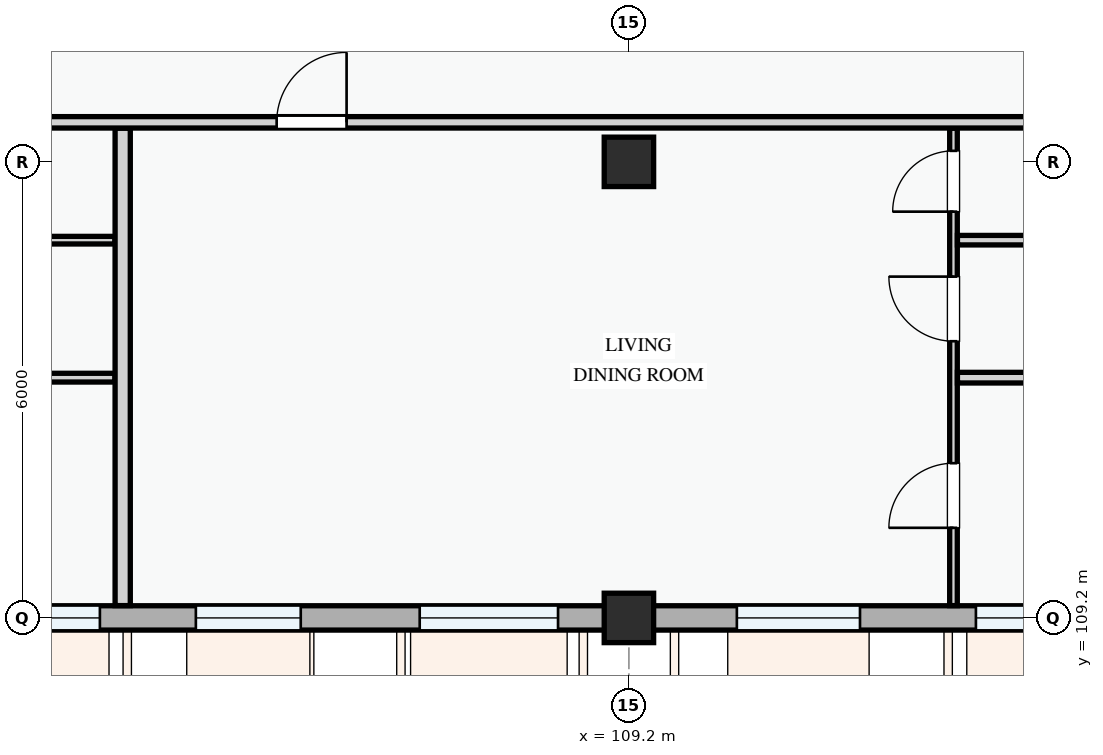
"""IFC4 building model, lengths in metres.
Left out: names, types, materials, properties, quantities, classifications, styles, units other than length and angle.
Written with IfcOpenShell. Run it as: python <this file> out.ifc"""

import sys

from ifc_helpers import new_model, si_unit, direction, frame, frame_2d, origin, origin_2d, place, context, subcontext, project, spatial, rectangle, extrude, element, fill, save


model = new_model("IFC4")
c1 = context("Model", 3, precision=1e-05, world=origin(), true_north=direction((0.0, 1.0)))
c2 = subcontext(c1, "Body", "Model", "MODEL_VIEW")
j1 = project(units=[si_unit("LENGTHUNIT", "METRE"), si_unit("PLANEANGLEUNIT", "RADIAN")], contexts=[c1])
p1 = place(None, origin())
s1 = spatial("IfcSite", under=j1, at=p1, CompositionType="ELEMENT")
p2 = place(p1, origin())
s2 = spatial("IfcBuilding", under=s1, at=p2, CompositionType="ELEMENT")
p3 = place(p2, frame((0.0, 0.0, 18.0)))
s3 = spatial("IfcBuildingStorey", under=s2, at=p3, CompositionType="ELEMENT", Elevation=18.0)
for number, where, z_axis, x_axis in (
    (1, (109.2, 109.2, 0.0), (0.0, 0.0, 1.0), (1.0, 0.0, 0.0)),
    (2, (109.2, 115.2, 0.0), (0.0, 0.0, 1.0), (1.0, 0.0, 0.0)),
):
    element("IfcColumn", number, at=place(p3, frame(where, z_axis=z_axis, x_axis=x_axis)), inside=s3, PredefinedType="COLUMN", context=c2, shape_type="SweptSolid", body=[
        extrude(rectangle(XDim=0.65, YDim=0.65, at=origin_2d()), origin(), (0.0, 0.0, 1.0), 3.3),
    ])
p4 = place(p3, frame((100.8, 109.2, 0.0), z_axis=(0.0, 0.0, 1.0), x_axis=(1.0, 0.0, 0.0)))
e3 = element("IfcWall", 3, at=p4, inside=s3, PredefinedType="STANDARD", context=c2, shape_type="SweptSolid", body=[
    extrude(rectangle(XDim=8.4, YDim=0.32, at=frame_2d((4.2, 0.0))), origin(), (0.0, 0.0, 1.0), 2.375),
])
p5 = place(p4, frame((0.49, 0.0, 0.78)))
e4 = element("IfcOpeningElement", 4, at=p5, cuts=e3, PredefinedType="OPENING", context=c2, shape_type="SweptSolid", body=[
    extrude(rectangle(XDim=0.95, YDim=1.15, at=frame_2d((0.475, 0.575))), frame((0.0, 0.17, 0.0), z_axis=(0.0, -1.0, 0.0), x_axis=(1.0, 0.0, 0.0)), (0.0, 0.0, 1.0), 0.34),
])
p6 = place(p4, frame((2.702, 0.0, 0.78)))
e5 = element("IfcOpeningElement", 5, at=p6, cuts=e3, PredefinedType="OPENING", context=c2, shape_type="SweptSolid", body=[
    extrude(rectangle(XDim=1.38, YDim=1.48, at=frame_2d((0.69, 0.74))), frame((0.0, 0.17, 0.0), z_axis=(0.0, -1.0, 0.0), x_axis=(1.0, 0.0, 0.0)), (0.0, 0.0, 1.0), 0.34),
])
p7 = place(p4, frame((5.647, 0.0, 0.78)))
e6 = element("IfcOpeningElement", 6, at=p7, cuts=e3, PredefinedType="OPENING", context=c2, shape_type="SweptSolid", body=[
    extrude(rectangle(XDim=1.82, YDim=1.46, at=frame_2d((0.91, 0.73))), frame((0.0, 0.17, 0.0), z_axis=(0.0, -1.0, 0.0), x_axis=(1.0, 0.0, 0.0)), (0.0, 0.0, 1.0), 0.34),
])
p8 = place(p3, frame((109.2, 109.2, 0.0), z_axis=(0.0, 0.0, 1.0), x_axis=(1.0, 0.0, 0.0)))
e7 = element("IfcWall", 7, at=p8, inside=s3, PredefinedType="STANDARD", context=c2, shape_type="SweptSolid", body=[
    extrude(rectangle(XDim=6.0, YDim=0.32, at=frame_2d((3.0, 0.0))), origin(), (0.0, 0.0, 1.0), 2.475),
])
p9 = place(p8, frame((1.42, 0.0, 0.78)))
e8 = element("IfcOpeningElement", 8, at=p9, cuts=e7, PredefinedType="OPENING", context=c2, shape_type="SweptSolid", body=[
    extrude(rectangle(XDim=1.62, YDim=1.38, at=frame_2d((0.81, 0.69))), frame((0.0, 0.17, 0.0), z_axis=(0.0, -1.0, 0.0), x_axis=(1.0, 0.0, 0.0)), (0.0, 0.0, 1.0), 0.34),
])
p10 = place(p8, frame((4.565, 0.0, 0.78)))
e9 = element("IfcOpeningElement", 9, at=p10, cuts=e7, PredefinedType="OPENING", context=c2, shape_type="SweptSolid", body=[
    extrude(rectangle(XDim=0.95, YDim=1.15, at=frame_2d((0.475, 0.575))), frame((0.0, 0.17, 0.0), z_axis=(0.0, -1.0, 0.0), x_axis=(1.0, 0.0, 0.0)), (0.0, 0.0, 1.0), 0.34),
])
p11 = place(p3, frame((91.564, 112.361, 0.0), z_axis=(0.0, 0.0, 1.0), x_axis=(1.0, 0.0, 0.0)))
e10 = element("IfcWall", 10, at=p11, inside=s3, PredefinedType="PARTITIONING", context=c2, shape_type="SweptSolid", body=[
    extrude(rectangle(XDim=10.874, YDim=0.115, at=frame_2d((5.437, 0.0))), origin(), (0.0, 0.0, 1.0), 3.0),
])
p12 = place(p3, frame((91.564, 114.17, 0.0), z_axis=(0.0, 0.0, 1.0), x_axis=(1.0, 0.0, 0.0)))
e11 = element("IfcWall", 11, at=p12, inside=s3, PredefinedType="PARTITIONING", context=c2, shape_type="SweptSolid", body=[
    extrude(rectangle(XDim=10.874, YDim=0.1, at=frame_2d((5.437, 0.0))), origin(), (0.0, 0.0, 1.0), 3.0),
])
p13 = place(p3, frame((113.47, 109.362, 0.0), z_axis=(0.0, 0.0, 1.0), x_axis=(0.0, 1.0, 0.0)))
e12 = element("IfcWall", 12, at=p13, inside=s3, PredefinedType="PARTITIONING", context=c2, shape_type="SweptSolid", body=[
    extrude(rectangle(XDim=6.281, YDim=0.1, at=frame_2d((3.141, 0.0))), origin(), (0.0, 0.0, 1.0), 3.0),
])
p14 = place(p13, frame((1.023, 0.0, 0.0)))
e13 = element("IfcOpeningElement", 13, at=p14, cuts=e12, PredefinedType="OPENING", context=c2, shape_type="SweptSolid", body=[
    extrude(rectangle(XDim=0.85, YDim=2.1, at=frame_2d((0.425, 1.05))), frame((0.0, 0.06, 0.0), z_axis=(0.0, -1.0, 0.0), x_axis=(1.0, 0.0, 0.0)), (0.0, 0.0, 1.0), 0.12),
])
p15 = place(p13, frame((3.478, 0.0, 0.0)))
e14 = element("IfcOpeningElement", 14, at=p15, cuts=e12, PredefinedType="OPENING", context=c2, shape_type="SweptSolid", body=[
    extrude(rectangle(XDim=0.85, YDim=2.1, at=frame_2d((0.425, 1.05))), frame((0.0, 0.06, 0.0), z_axis=(0.0, -1.0, 0.0), x_axis=(1.0, 0.0, 0.0)), (0.0, 0.0, 1.0), 0.12),
])
p16 = place(p13, frame((5.183, 0.0, 0.0)))
e15 = element("IfcOpeningElement", 15, at=p16, cuts=e12, PredefinedType="OPENING", context=c2, shape_type="SweptSolid", body=[
    extrude(rectangle(XDim=0.8, YDim=2.1, at=frame_2d((0.4, 1.05))), frame((0.0, 0.06, 0.0), z_axis=(0.0, -1.0, 0.0), x_axis=(1.0, 0.0, 0.0)), (0.0, 0.0, 1.0), 0.12),
])
p17 = place(p3, frame((113.522, 112.361, 0.0), z_axis=(0.0, 0.0, 1.0), x_axis=(1.0, 0.0, 0.0)))
e16 = element("IfcWall", 16, at=p17, inside=s3, PredefinedType="PARTITIONING", context=c2, shape_type="SweptSolid", body=[
    extrude(rectangle(XDim=11.783, YDim=0.14, at=frame_2d((5.892, 0.0))), origin(), (0.0, 0.0, 1.0), 3.0),
])
p18 = place(p3, frame((113.522, 114.17, 0.0), z_axis=(0.0, 0.0, 1.0), x_axis=(1.0, 0.0, 0.0)))
e17 = element("IfcWall", 17, at=p18, inside=s3, PredefinedType="PARTITIONING", context=c2, shape_type="SweptSolid", body=[
    extrude(rectangle(XDim=11.783, YDim=0.125, at=frame_2d((5.892, 0.0))), origin(), (0.0, 0.0, 1.0), 3.0),
])
p19 = place(p3, frame((102.54, 109.362, 0.0), z_axis=(0.0, 0.0, 1.0), x_axis=(0.0, 1.0, 0.0)))
e18 = element("IfcWall", 18, at=p19, inside=s3, PredefinedType="PARTITIONING", context=c2, shape_type="SweptSolid", body=[
    extrude(rectangle(XDim=6.281, YDim=0.2, at=frame_2d((3.141, 0.0))), origin(), (0.0, 0.0, 1.0), 3.0),
])
p20 = place(p3, frame((80.562, 115.72, 0.0), z_axis=(0.0, 0.0, 1.0), x_axis=(1.0, 0.0, 0.0)))
e19 = element("IfcWall", 19, at=p20, inside=s3, PredefinedType="PARTITIONING", context=c2, shape_type="SweptSolid", body=[
    extrude(rectangle(XDim=69.488, YDim=0.15, at=frame_2d((34.744, 0.0))), origin(), (0.0, 0.0, 1.0), 3.0),
])
p21 = place(p20, frame((9.429, 0.0, 0.0)))
e20 = element("IfcOpeningElement", 20, at=p21, cuts=e19, PredefinedType="OPENING", context=c2, shape_type="SweptSolid", body=[
    extrude(rectangle(XDim=0.96, YDim=2.12, at=frame_2d((0.48, 1.06))), frame((0.0, 0.085, 0.0), z_axis=(0.0, -1.0, 0.0), x_axis=(1.0, 0.0, 0.0)), (0.0, 0.0, 1.0), 0.17),
])
p22 = place(p20, frame((24.004, 0.0, 0.0)))
e21 = element("IfcOpeningElement", 21, at=p22, cuts=e19, PredefinedType="OPENING", context=c2, shape_type="SweptSolid", body=[
    extrude(rectangle(XDim=0.92, YDim=2.1, at=frame_2d((0.46, 1.05))), frame((0.0, 0.085, 0.0), z_axis=(0.0, -1.0, 0.0), x_axis=(1.0, 0.0, 0.0)), (0.0, 0.0, 1.0), 0.17),
])
p23 = place(p20, frame((52.697, 0.0, 0.0)))
e22 = element("IfcOpeningElement", 22, at=p23, cuts=e19, PredefinedType="OPENING", context=c2, shape_type="SweptSolid", body=[
    extrude(rectangle(XDim=0.92, YDim=2.1, at=frame_2d((0.46, 1.05))), frame((0.0, 0.085, 0.0), z_axis=(0.0, -1.0, 0.0), x_axis=(1.0, 0.0, 0.0)), (0.0, 0.0, 1.0), 0.17),
])
p24 = place(p5, origin())
e23 = element("IfcWindow", 23, at=p24, inside=s3, PartitioningType="SINGLE_PANEL", PredefinedType="WINDOW", context=c2, shape_type="SweptSolid", body=[
    extrude(rectangle(XDim=0.95, YDim=1.15, at=frame_2d((0.475, 0.575))), frame((0.0, 0.03, 0.0), z_axis=(0.0, -1.0, 0.0), x_axis=(1.0, 0.0, 0.0)), (0.0, 0.0, 1.0), 0.06),
])
fill(e4, e23)
p25 = place(p6, origin())
e24 = element("IfcWindow", 24, at=p25, inside=s3, PartitioningType="SINGLE_PANEL", PredefinedType="WINDOW", context=c2, shape_type="SweptSolid", body=[
    extrude(rectangle(XDim=1.38, YDim=1.48, at=frame_2d((0.69, 0.74))), frame((0.0, 0.03, 0.0), z_axis=(0.0, -1.0, 0.0), x_axis=(1.0, 0.0, 0.0)), (0.0, 0.0, 1.0), 0.06),
])
fill(e5, e24)
p26 = place(p7, origin())
e25 = element("IfcWindow", 25, at=p26, inside=s3, PartitioningType="DOUBLE_PANEL_VERTICAL", PredefinedType="WINDOW", context=c2, shape_type="SweptSolid", body=[
    extrude(rectangle(XDim=1.82, YDim=1.46, at=frame_2d((0.91, 0.73))), frame((0.0, 0.03, 0.0), z_axis=(0.0, -1.0, 0.0), x_axis=(1.0, 0.0, 0.0)), (0.0, 0.0, 1.0), 0.06),
])
fill(e6, e25)
p27 = place(p9, origin())
e26 = element("IfcWindow", 26, at=p27, inside=s3, PartitioningType="DOUBLE_PANEL_VERTICAL", PredefinedType="WINDOW", context=c2, shape_type="SweptSolid", body=[
    extrude(rectangle(XDim=1.62, YDim=1.38, at=frame_2d((0.81, 0.69))), frame((0.0, 0.03, 0.0), z_axis=(0.0, -1.0, 0.0), x_axis=(1.0, 0.0, 0.0)), (0.0, 0.0, 1.0), 0.06),
])
fill(e8, e26)
p28 = place(p10, origin())
e27 = element("IfcWindow", 27, at=p28, inside=s3, PartitioningType="SINGLE_PANEL", PredefinedType="WINDOW", context=c2, shape_type="SweptSolid", body=[
    extrude(rectangle(XDim=0.95, YDim=1.15, at=frame_2d((0.475, 0.575))), frame((0.0, 0.03, 0.0), z_axis=(0.0, -1.0, 0.0), x_axis=(1.0, 0.0, 0.0)), (0.0, 0.0, 1.0), 0.06),
])
fill(e9, e27)
p29 = place(p14, origin())
e28 = element("IfcDoor", 28, at=p29, inside=s3, OperationType="SINGLE_SWING_LEFT", PredefinedType="DOOR", context=c2, shape_type="SweptSolid", body=[
    extrude(rectangle(XDim=0.85, YDim=2.1, at=frame_2d((0.425, 1.05))), frame((0.0, 0.025, 0.0), z_axis=(0.0, -1.0, 0.0), x_axis=(1.0, 0.0, 0.0)), (0.0, 0.0, 1.0), 0.05),
])
fill(e13, e28)
p30 = place(p15, origin())
e29 = element("IfcDoor", 29, at=p30, inside=s3, OperationType="SINGLE_SWING_RIGHT", PredefinedType="DOOR", context=c2, shape_type="SweptSolid", body=[
    extrude(rectangle(XDim=0.85, YDim=2.1, at=frame_2d((0.425, 1.05))), frame((0.0, 0.025, 0.0), z_axis=(0.0, -1.0, 0.0), x_axis=(1.0, 0.0, 0.0)), (0.0, 0.0, 1.0), 0.05),
])
fill(e14, e29)
p31 = place(p16, origin())
e30 = element("IfcDoor", 30, at=p31, inside=s3, OperationType="SINGLE_SWING_LEFT", PredefinedType="DOOR", context=c2, shape_type="SweptSolid", body=[
    extrude(rectangle(XDim=0.8, YDim=2.1, at=frame_2d((0.4, 1.05))), frame((0.0, 0.025, 0.0), z_axis=(0.0, -1.0, 0.0), x_axis=(1.0, 0.0, 0.0)), (0.0, 0.0, 1.0), 0.05),
])
fill(e15, e30)
p32 = place(p22, origin())
e31 = element("IfcDoor", 31, at=p32, inside=s3, OperationType="SINGLE_SWING_RIGHT", PredefinedType="DOOR", context=c2, shape_type="SweptSolid", body=[
    extrude(rectangle(XDim=0.92, YDim=2.1, at=frame_2d((0.46, 1.05))), frame((0.0, 0.025, 0.0), z_axis=(0.0, -1.0, 0.0), x_axis=(1.0, 0.0, 0.0)), (0.0, 0.0, 1.0), 0.05),
])
fill(e21, e31)
save(model, sys.argv[1])
